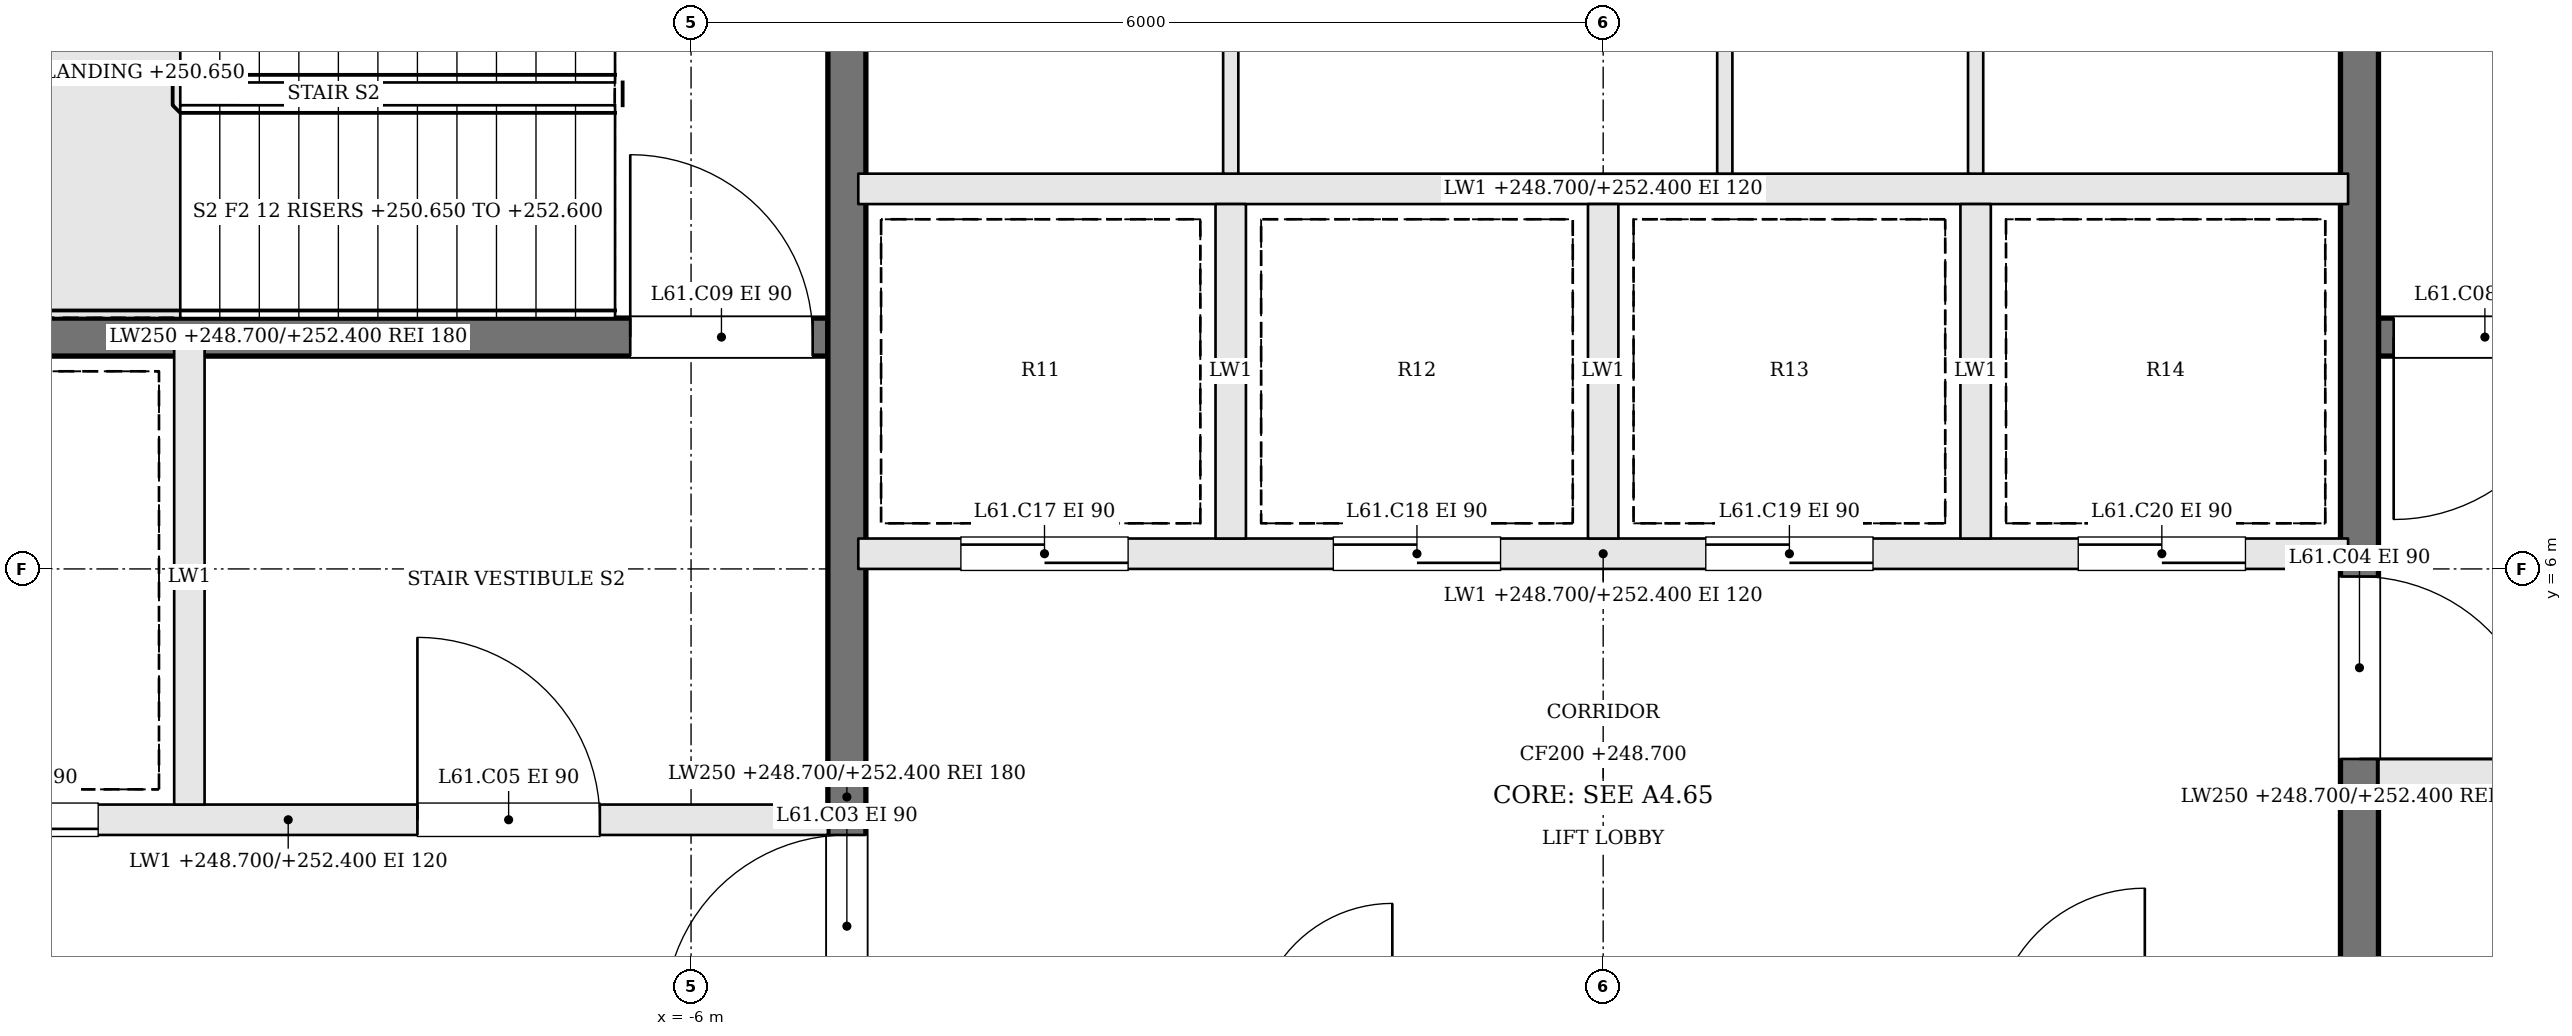
"""IFC4 building model, lengths in metres.
Left out: names, types, materials, properties, quantities, classifications, styles, units other than length and angle.
Written with IfcOpenShell. Run it as: python <this file> out.ifc"""

import sys

from ifc_helpers import new_model, si_unit, direction, frame, frame_2d, origin, place, context, subcontext, project, spatial, rectangle, extrude, element, fill, save


model = new_model("IFC4")
c1 = context("Model", 3, precision=1e-05, world=origin(), true_north=direction((0.0, 1.0)))
c2 = subcontext(c1, "Body", "Model", "MODEL_VIEW")
j1 = project(units=[si_unit("LENGTHUNIT", "METRE"), si_unit("PLANEANGLEUNIT", "RADIAN")], contexts=[c1])
p1 = place(None, origin())
s1 = spatial("IfcSite", under=j1, at=p1, CompositionType="ELEMENT")
p2 = place(p1, origin())
s2 = spatial("IfcBuilding", under=s1, at=p2, CompositionType="ELEMENT")
p3 = place(p2, frame((0.0, 0.0, 248.7)))
s3 = spatial("IfcBuildingStorey", under=s2, at=p3, CompositionType="ELEMENT", Elevation=248.7)
p4 = place(p3, frame((12.2, 7.525, 0.0), z_axis=(0.0, 0.0, 1.0), x_axis=(-1.0, 0.0, 0.0)))
e1 = element("IfcWall", 1, at=p4, inside=s3, PredefinedType="SOLIDWALL", context=c2, shape_type="SweptSolid", body=[
    extrude(rectangle(XDim=7.1, YDim=0.25, at=frame_2d((3.55, 0.0))), origin(), (0.0, 0.0, 1.0), 3.7),
])
p5 = place(p4, frame((5.8, 0.0, 0.0)))
e2 = element("IfcOpeningElement", 2, at=p5, cuts=e1, PredefinedType="OPENING", context=c2, shape_type="SweptSolid", body=[
    extrude(rectangle(XDim=1.2, YDim=2.1, at=frame_2d((0.6, 1.05))), frame((0.0, 0.135, 0.0), z_axis=(0.0, -1.0, 0.0), x_axis=(1.0, 0.0, 0.0)), (0.0, 0.0, 1.0), 0.27),
])
p6 = place(p3, frame((-12.2, 4.35, 0.0), z_axis=(0.0, 0.0, 1.0), x_axis=(1.0, 0.0, 0.0)))
e3 = element("IfcWall", 3, at=p6, inside=s3, PredefinedType="SOLIDWALL", context=c2, shape_type="SweptSolid", body=[
    extrude(rectangle(XDim=7.1, YDim=0.2, at=frame_2d((3.55, 0.0))), origin(), (0.0, 0.0, 1.0), 3.7),
])
p7 = place(p6, frame((4.4, 0.0, 0.0)))
e4 = element("IfcOpeningElement", 4, at=p7, cuts=e3, PredefinedType="OPENING", context=c2, shape_type="SweptSolid", body=[
    extrude(rectangle(XDim=1.2, YDim=2.1, at=frame_2d((0.6, 1.05))), frame((0.0, 0.11, 0.0), z_axis=(0.0, -1.0, 0.0), x_axis=(1.0, 0.0, 0.0)), (0.0, 0.0, 1.0), 0.22),
])
p8 = place(p6, frame((1.1, 0.0, 0.0)))
e5 = element("IfcOpeningElement", 5, at=p8, cuts=e3, PredefinedType="OPENING", context=c2, shape_type="SweptSolid", body=[
    extrude(rectangle(XDim=1.2, YDim=2.1, at=frame_2d((0.6, 1.05))), frame((0.0, 0.11, 0.0), z_axis=(0.0, -1.0, 0.0), x_axis=(1.0, 0.0, 0.0)), (0.0, 0.0, 1.0), 0.22),
])
p9 = place(p3, frame((12.2, 4.65, 0.0), z_axis=(0.0, 0.0, 1.0), x_axis=(-1.0, 0.0, 0.0)))
e6 = element("IfcWall", 6, at=p9, inside=s3, PredefinedType="SOLIDWALL", context=c2, shape_type="SweptSolid", body=[
    extrude(rectangle(XDim=7.1, YDim=0.2, at=frame_2d((3.55, 0.0))), origin(), (0.0, 0.0, 1.0), 3.7),
])
p10 = place(p9, frame((4.4, 0.0, 0.0)))
e7 = element("IfcOpeningElement", 7, at=p10, cuts=e6, PredefinedType="OPENING", context=c2, shape_type="SweptSolid", body=[
    extrude(rectangle(XDim=1.2, YDim=2.1, at=frame_2d((0.6, 1.05))), frame((0.0, 0.11, 0.0), z_axis=(0.0, -1.0, 0.0), x_axis=(1.0, 0.0, 0.0)), (0.0, 0.0, 1.0), 0.22),
])
p11 = place(p9, frame((1.1, 0.0, 0.0)))
e8 = element("IfcOpeningElement", 8, at=p11, cuts=e6, PredefinedType="OPENING", context=c2, shape_type="SweptSolid", body=[
    extrude(rectangle(XDim=1.2, YDim=2.1, at=frame_2d((0.6, 1.05))), frame((0.0, 0.11, 0.0), z_axis=(0.0, -1.0, 0.0), x_axis=(1.0, 0.0, 0.0)), (0.0, 0.0, 1.0), 0.22),
])
p12 = place(p3, frame((-12.2, 7.525, 0.0), z_axis=(0.0, 0.0, 1.0), x_axis=(1.0, 0.0, 0.0)))
e9 = element("IfcWall", 9, at=p12, inside=s3, PredefinedType="SOLIDWALL", context=c2, shape_type="SweptSolid", body=[
    extrude(rectangle(XDim=7.1, YDim=0.25, at=frame_2d((3.55, 0.0))), origin(), (0.0, 0.0, 1.0), 3.7),
])
p13 = place(p12, frame((5.8, 0.0, 0.0)))
e10 = element("IfcOpeningElement", 10, at=p13, cuts=e9, PredefinedType="OPENING", context=c2, shape_type="SweptSolid", body=[
    extrude(rectangle(XDim=1.2, YDim=2.1, at=frame_2d((0.6, 1.05))), frame((0.0, 0.135, 0.0), z_axis=(0.0, -1.0, 0.0), x_axis=(1.0, 0.0, 0.0)), (0.0, 0.0, 1.0), 0.27),
])
p14 = place(p3, frame((-9.3, 4.45, 0.0), z_axis=(0.0, 0.0, 1.0), x_axis=(0.0, 1.0, 0.0)))
e11 = element("IfcWall", 11, at=p14, inside=s3, PredefinedType="SOLIDWALL", context=c2, shape_type="SweptSolid", body=[
    extrude(rectangle(XDim=3.0, YDim=0.2, at=frame_2d((1.5, 0.0))), origin(), (0.0, 0.0, 1.0), 3.7),
])
p15 = place(p3, frame((-4.975, -2.2, 0.0), z_axis=(0.0, 0.0, 1.0), x_axis=(0.0, 1.0, 0.0)))
e12 = element("IfcWall", 12, at=p15, inside=s3, PredefinedType="SOLIDWALL", context=c2, shape_type="SweptSolid", body=[
    extrude(rectangle(XDim=13.4, YDim=0.25, at=frame_2d((6.7, 0.0))), origin(), (0.0, 0.0, 1.0), 3.7),
])
p16 = place(p15, frame((5.25, 0.0, 0.0)))
e13 = element("IfcOpeningElement", 13, at=p16, cuts=e12, PredefinedType="OPENING", context=c2, shape_type="SweptSolid", body=[
    extrude(rectangle(XDim=1.2, YDim=2.1, at=frame_2d((0.6, 1.05))), frame((0.0, 0.135, 0.0), z_axis=(0.0, -1.0, 0.0), x_axis=(1.0, 0.0, 0.0)), (0.0, 0.0, 1.0), 0.27),
])
p17 = place(p3, frame((4.975, 11.2, 0.0), z_axis=(0.0, 0.0, 1.0), x_axis=(0.0, -1.0, 0.0)))
e14 = element("IfcWall", 14, at=p17, inside=s3, PredefinedType="SOLIDWALL", context=c2, shape_type="SweptSolid", body=[
    extrude(rectangle(XDim=13.4, YDim=0.25, at=frame_2d((6.7, 0.0))), origin(), (0.0, 0.0, 1.0), 3.7),
])
p18 = place(p17, frame((5.25, 0.0, 0.0)))
e15 = element("IfcOpeningElement", 15, at=p18, cuts=e14, PredefinedType="OPENING", context=c2, shape_type="SweptSolid", body=[
    extrude(rectangle(XDim=1.2, YDim=2.1, at=frame_2d((0.6, 1.05))), frame((0.0, 0.135, 0.0), z_axis=(0.0, -1.0, 0.0), x_axis=(1.0, 0.0, 0.0)), (0.0, 0.0, 1.0), 0.27),
])
p19 = place(p3, frame((-4.9, 6.1, 0.0), z_axis=(0.0, 0.0, 1.0), x_axis=(1.0, 0.0, 0.0)))
e16 = element("IfcWall", 16, at=p19, inside=s3, PredefinedType="SOLIDWALL", context=c2, shape_type="SweptSolid", body=[
    extrude(rectangle(XDim=9.8, YDim=0.2, at=frame_2d((4.9, 0.0))), origin(), (0.0, 0.0, 1.0), 3.7),
])
p20 = place(p19, frame((0.675, 0.0, 0.0)))
e17 = element("IfcOpeningElement", 17, at=p20, cuts=e16, PredefinedType="OPENING", context=c2, shape_type="SweptSolid", body=[
    extrude(rectangle(XDim=1.1, YDim=2.1, at=frame_2d((0.55, 1.05))), frame((0.0, 0.11, 0.0), z_axis=(0.0, -1.0, 0.0), x_axis=(1.0, 0.0, 0.0)), (0.0, 0.0, 1.0), 0.22),
])
p21 = place(p19, frame((3.125, 0.0, 0.0)))
e18 = element("IfcOpeningElement", 18, at=p21, cuts=e16, PredefinedType="OPENING", context=c2, shape_type="SweptSolid", body=[
    extrude(rectangle(XDim=1.1, YDim=2.1, at=frame_2d((0.55, 1.05))), frame((0.0, 0.11, 0.0), z_axis=(0.0, -1.0, 0.0), x_axis=(1.0, 0.0, 0.0)), (0.0, 0.0, 1.0), 0.22),
])
p22 = place(p19, frame((5.575, 0.0, 0.0)))
e19 = element("IfcOpeningElement", 19, at=p22, cuts=e16, PredefinedType="OPENING", context=c2, shape_type="SweptSolid", body=[
    extrude(rectangle(XDim=1.1, YDim=2.1, at=frame_2d((0.55, 1.05))), frame((0.0, 0.11, 0.0), z_axis=(0.0, -1.0, 0.0), x_axis=(1.0, 0.0, 0.0)), (0.0, 0.0, 1.0), 0.22),
])
p23 = place(p19, frame((8.025, 0.0, 0.0)))
e20 = element("IfcOpeningElement", 20, at=p23, cuts=e16, PredefinedType="OPENING", context=c2, shape_type="SweptSolid", body=[
    extrude(rectangle(XDim=1.1, YDim=2.1, at=frame_2d((0.55, 1.05))), frame((0.0, 0.11, 0.0), z_axis=(0.0, -1.0, 0.0), x_axis=(1.0, 0.0, 0.0)), (0.0, 0.0, 1.0), 0.22),
])
p24 = place(p3, frame((-4.9, 8.5, 0.0), z_axis=(0.0, 0.0, 1.0), x_axis=(1.0, 0.0, 0.0)))
e21 = element("IfcWall", 21, at=p24, inside=s3, PredefinedType="SOLIDWALL", context=c2, shape_type="SweptSolid", body=[
    extrude(rectangle(XDim=9.8, YDim=0.2, at=frame_2d((4.9, 0.0))), origin(), (0.0, 0.0, 1.0), 3.7),
])
for number, where, z_axis, x_axis in (
    (22, (-2.45, 6.2, 0.0), (0.0, 0.0, 1.0), (0.0, 1.0, 0.0)),
    (23, (0.0, 6.2, 0.0), (0.0, 0.0, 1.0), (0.0, 1.0, 0.0)),
    (24, (2.45, 6.2, 0.0), (0.0, 0.0, 1.0), (0.0, 1.0, 0.0)),
):
    element("IfcWall", number, at=place(p3, frame(where, z_axis=z_axis, x_axis=x_axis)), inside=s3, PredefinedType="SOLIDWALL", context=c2, shape_type="SweptSolid", body=[
        extrude(rectangle(XDim=2.2, YDim=0.2, at=frame_2d((1.1, 0.0))), origin(), (0.0, 0.0, 1.0), 3.7),
    ])
for number, where, z_axis, x_axis in (
    (25, (-2.45, 8.6, 0.0), (0.0, 0.0, 1.0), (0.0, 1.0, 0.0)),
    (26, (0.8, 8.6, 0.0), (0.0, 0.0, 1.0), (0.0, 1.0, 0.0)),
    (27, (2.45, 8.6, 0.0), (0.0, 0.0, 1.0), (0.0, 1.0, 0.0)),
):
    element("IfcWall", number, at=place(p3, frame(where, z_axis=z_axis, x_axis=x_axis)), inside=s3, PredefinedType="PARTITIONING", context=c2, shape_type="SweptSolid", body=[
        extrude(rectangle(XDim=2.6, YDim=0.1, at=frame_2d((1.3, 0.0))), origin(), (0.0, 0.0, 1.0), 3.7),
    ])
p25 = place(p16, origin())
e28 = element("IfcDoor", 28, at=p25, inside=s3, OperationType="SINGLE_SWING_LEFT", PredefinedType="DOOR", context=c2, shape_type="SweptSolid", body=[
    extrude(rectangle(XDim=1.2, YDim=2.1, at=frame_2d((0.6, 1.05))), frame((0.0, 0.025, 0.0), z_axis=(0.0, -1.0, 0.0), x_axis=(1.0, 0.0, 0.0)), (0.0, 0.0, 1.0), 0.05),
])
fill(e13, e28)
p26 = place(p18, origin())
e29 = element("IfcDoor", 29, at=p26, inside=s3, OperationType="SINGLE_SWING_RIGHT", PredefinedType="DOOR", context=c2, shape_type="SweptSolid", body=[
    extrude(rectangle(XDim=1.2, YDim=2.1, at=frame_2d((0.6, 1.05))), frame((0.0, 0.025, 0.0), z_axis=(0.0, -1.0, 0.0), x_axis=(1.0, 0.0, 0.0)), (0.0, 0.0, 1.0), 0.05),
])
fill(e15, e29)
p27 = place(p7, origin())
e30 = element("IfcDoor", 30, at=p27, inside=s3, OperationType="SINGLE_SWING_LEFT", PredefinedType="DOOR", context=c2, shape_type="SweptSolid", body=[
    extrude(rectangle(XDim=1.2, YDim=2.1, at=frame_2d((0.6, 1.05))), frame((0.0, 0.025, 0.0), z_axis=(0.0, -1.0, 0.0), x_axis=(1.0, 0.0, 0.0)), (0.0, 0.0, 1.0), 0.05),
])
fill(e4, e30)
p28 = place(p5, origin())
e31 = element("IfcDoor", 31, at=p28, inside=s3, OperationType="SINGLE_SWING_RIGHT", PredefinedType="DOOR", context=c2, shape_type="SweptSolid", body=[
    extrude(rectangle(XDim=1.2, YDim=2.1, at=frame_2d((0.6, 1.05))), frame((0.0, 0.025, 0.0), z_axis=(0.0, -1.0, 0.0), x_axis=(1.0, 0.0, 0.0)), (0.0, 0.0, 1.0), 0.05),
])
fill(e2, e31)
p29 = place(p13, origin())
e32 = element("IfcDoor", 32, at=p29, inside=s3, OperationType="SINGLE_SWING_LEFT", PredefinedType="DOOR", context=c2, shape_type="SweptSolid", body=[
    extrude(rectangle(XDim=1.2, YDim=2.1, at=frame_2d((0.6, 1.05))), frame((0.0, 0.025, 0.0), z_axis=(0.0, -1.0, 0.0), x_axis=(1.0, 0.0, 0.0)), (0.0, 0.0, 1.0), 0.05),
])
fill(e10, e32)
p30 = place(p8, origin())
e33 = element("IfcDoor", 33, at=p30, inside=s3, OperationType="SLIDING_TO_RIGHT", PredefinedType="DOOR", context=c2, shape_type="SweptSolid", body=[
    extrude(rectangle(XDim=1.2, YDim=2.1, at=frame_2d((0.6, 1.05))), frame((0.0, 0.025, 0.0), z_axis=(0.0, -1.0, 0.0), x_axis=(1.0, 0.0, 0.0)), (0.0, 0.0, 1.0), 0.05),
])
fill(e5, e33)
p31 = place(p20, origin())
e34 = element("IfcDoor", 34, at=p31, inside=s3, OperationType="SLIDING_TO_RIGHT", PredefinedType="DOOR", context=c2, shape_type="SweptSolid", body=[
    extrude(rectangle(XDim=1.1, YDim=2.1, at=frame_2d((0.55, 1.05))), frame((0.0, 0.025, 0.0), z_axis=(0.0, -1.0, 0.0), x_axis=(1.0, 0.0, 0.0)), (0.0, 0.0, 1.0), 0.05),
])
fill(e17, e34)
p32 = place(p21, origin())
e35 = element("IfcDoor", 35, at=p32, inside=s3, OperationType="SLIDING_TO_LEFT", PredefinedType="DOOR", context=c2, shape_type="SweptSolid", body=[
    extrude(rectangle(XDim=1.1, YDim=2.1, at=frame_2d((0.55, 1.05))), frame((0.0, 0.025, 0.0), z_axis=(0.0, -1.0, 0.0), x_axis=(1.0, 0.0, 0.0)), (0.0, 0.0, 1.0), 0.05),
])
fill(e18, e35)
p33 = place(p22, origin())
e36 = element("IfcDoor", 36, at=p33, inside=s3, OperationType="SLIDING_TO_RIGHT", PredefinedType="DOOR", context=c2, shape_type="SweptSolid", body=[
    extrude(rectangle(XDim=1.1, YDim=2.1, at=frame_2d((0.55, 1.05))), frame((0.0, 0.025, 0.0), z_axis=(0.0, -1.0, 0.0), x_axis=(1.0, 0.0, 0.0)), (0.0, 0.0, 1.0), 0.05),
])
fill(e19, e36)
p34 = place(p23, origin())
e37 = element("IfcDoor", 37, at=p34, inside=s3, OperationType="SLIDING_TO_LEFT", PredefinedType="DOOR", context=c2, shape_type="SweptSolid", body=[
    extrude(rectangle(XDim=1.1, YDim=2.1, at=frame_2d((0.55, 1.05))), frame((0.0, 0.025, 0.0), z_axis=(0.0, -1.0, 0.0), x_axis=(1.0, 0.0, 0.0)), (0.0, 0.0, 1.0), 0.05),
])
fill(e20, e37)
save(model, sys.argv[1])
